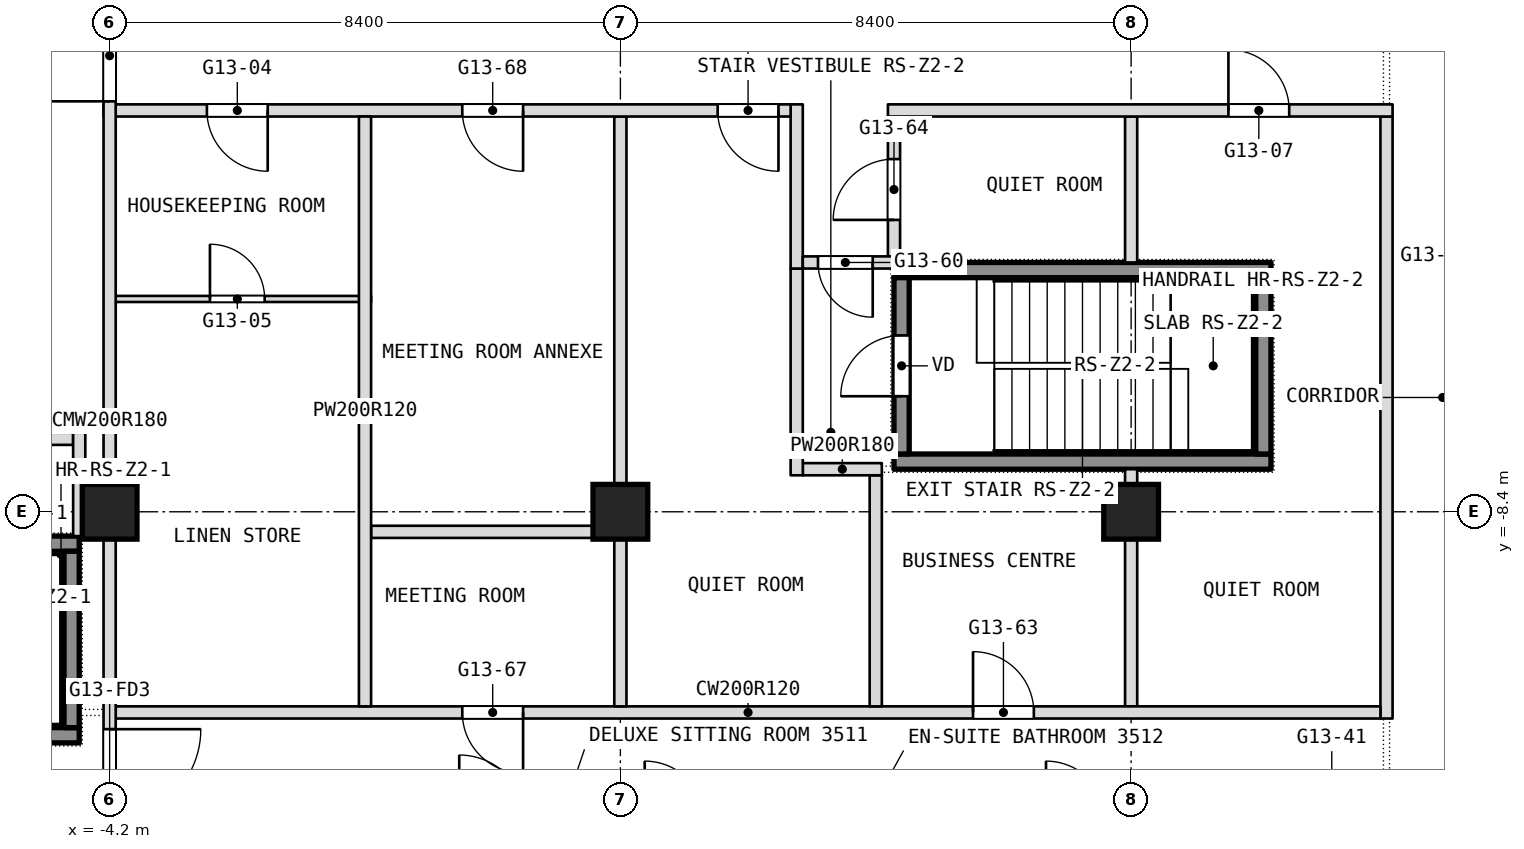
"""IFC4 building model, lengths in metres.
Left out: names, types, materials, properties, quantities, classifications, styles, units other than length and angle.
Written with IfcOpenShell. Run it as: python <this file> out.ifc"""

import sys

from ifc_helpers import new_model, si_unit, direction, frame, frame_2d, origin, origin_2d, place, context, subcontext, project, spatial, rectangle, extrude, element, fill, save


model = new_model("IFC4")
c1 = context("Model", 3, precision=1e-05, world=origin(), true_north=direction((0.0, 1.0)))
c2 = subcontext(c1, "Body", "Model", "MODEL_VIEW")
j1 = project(units=[si_unit("LENGTHUNIT", "METRE"), si_unit("PLANEANGLEUNIT", "RADIAN")], contexts=[c1])
p1 = place(None, origin())
s1 = spatial("IfcSite", under=j1, at=p1, CompositionType="ELEMENT")
p2 = place(p1, origin())
s2 = spatial("IfcBuilding", under=s1, at=p2, CompositionType="ELEMENT")
p3 = place(p2, frame((0.0, 0.0, 151.7)))
s3 = spatial("IfcBuildingStorey", under=s2, at=p3, CompositionType="ELEMENT", Elevation=151.7)
for number, where, z_axis, x_axis in (
    (1, (-4.2, -8.4, 0.0), (0.0, 0.0, 1.0), (1.0, 0.0, 0.0)),
    (2, (4.2, -8.4, 0.0), (0.0, 0.0, 1.0), (1.0, 0.0, 0.0)),
    (3, (12.6, -8.4, 0.0), (0.0, 0.0, 1.0), (1.0, 0.0, 0.0)),
):
    element("IfcColumn", number, at=place(p3, frame(where, z_axis=z_axis, x_axis=x_axis)), inside=s3, PredefinedType="COLUMN", context=c2, shape_type="SweptSolid", body=[
        extrude(rectangle(XDim=0.9, YDim=0.9, at=origin_2d()), origin(), (0.0, 0.0, 1.0), 3.6),
    ])
p4 = place(p3, frame((16.8, -11.8, 0.0), z_axis=(0.0, 0.0, 1.0), x_axis=(0.0, 1.0, 0.0)))
e4 = element("IfcWall", 4, at=p4, inside=s3, PredefinedType="PARTITIONING", context=c2, shape_type="SweptSolid", body=[
    extrude(rectangle(XDim=9.9, YDim=0.2, at=frame_2d((4.95, 0.0))), origin(), (0.0, 0.0, 1.0), 3.34),
])
p5 = place(p3, frame((12.6, -11.6, 0.0), z_axis=(0.0, 0.0, 1.0), x_axis=(0.0, 1.0, 0.0)))
e5 = element("IfcWall", 5, at=p5, inside=s3, PredefinedType="PARTITIONING", context=c2, shape_type="SweptSolid", body=[
    extrude(rectangle(XDim=3.9, YDim=0.2, at=frame_2d((1.95, 0.0))), origin(), (0.0, 0.0, 1.0), 3.34),
])
p6 = place(p3, frame((12.6, -4.3, 0.0), z_axis=(0.0, 0.0, 1.0), x_axis=(0.0, 1.0, 0.0)))
e6 = element("IfcWall", 6, at=p6, inside=s3, PredefinedType="PARTITIONING", context=c2, shape_type="SweptSolid", body=[
    extrude(rectangle(XDim=2.4, YDim=0.2, at=frame_2d((1.2, 0.0))), origin(), (0.0, 0.0, 1.0), 3.34),
])
p7 = place(p3, frame((-4.1, -11.7, 0.0), z_axis=(0.0, 0.0, 1.0), x_axis=(1.0, 0.0, 0.0)))
e7 = element("IfcWall", 7, at=p7, inside=s3, PredefinedType="PARTITIONING", context=c2, shape_type="SweptSolid", body=[
    extrude(rectangle(XDim=20.8, YDim=0.2, at=frame_2d((10.4, 0.0))), origin(), (0.0, 0.0, 1.0), 3.34),
])
p8 = place(p7, frame((14.1, 0.0, 0.0)))
e8 = element("IfcOpeningElement", 8, at=p8, cuts=e7, PredefinedType="OPENING", context=c2, shape_type="SweptSolid", body=[
    extrude(rectangle(XDim=1.0, YDim=2.1, at=frame_2d((0.5, 1.05))), frame((0.0, 0.1, 0.0), z_axis=(0.0, -1.0, 0.0), x_axis=(1.0, 0.0, 0.0)), (0.0, 0.0, 1.0), 0.2),
])
p9 = place(p7, frame((5.7, 0.0, 0.0)))
e9 = element("IfcOpeningElement", 9, at=p9, cuts=e7, PredefinedType="OPENING", context=c2, shape_type="SweptSolid", body=[
    extrude(rectangle(XDim=1.0, YDim=2.1, at=frame_2d((0.5, 1.05))), frame((0.0, 0.1, 0.0), z_axis=(0.0, -1.0, 0.0), x_axis=(1.0, 0.0, 0.0)), (0.0, 0.0, 1.0), 0.2),
])
p10 = place(p3, frame((0.1, -8.73, 0.0), z_axis=(0.0, 0.0, 1.0), x_axis=(1.0, 0.0, 0.0)))
e10 = element("IfcWall", 10, at=p10, inside=s3, PredefinedType="PARTITIONING", context=c2, shape_type="SweptSolid", body=[
    extrude(rectangle(XDim=4.0, YDim=0.2, at=frame_2d((2.0, 0.0))), origin(), (0.0, 0.0, 1.0), 3.34),
])
p11 = place(p3, frame((8.7, -4.3, 0.0), z_axis=(0.0, 0.0, 1.0), x_axis=(0.0, 1.0, 0.0)))
e11 = element("IfcWall", 11, at=p11, inside=s3, PredefinedType="PARTITIONING", context=c2, shape_type="SweptSolid", body=[
    extrude(rectangle(XDim=2.4, YDim=0.2, at=frame_2d((1.2, 0.0))), origin(), (0.0, 0.0, 1.0), 3.34),
])
p12 = place(p11, frame((0.7, 0.0, 0.0)))
e12 = element("IfcOpeningElement", 12, at=p12, cuts=e11, PredefinedType="OPENING", context=c2, shape_type="SweptSolid", body=[
    extrude(rectangle(XDim=1.0, YDim=2.1, at=frame_2d((0.5, 1.05))), frame((0.0, 0.1, 0.0), z_axis=(0.0, -1.0, 0.0), x_axis=(1.0, 0.0, 0.0)), (0.0, 0.0, 1.0), 0.2),
])
p13 = place(p3, frame((8.4, -11.6, 0.0), z_axis=(0.0, 0.0, 1.0), x_axis=(0.0, 1.0, 0.0)))
e13 = element("IfcWall", 13, at=p13, inside=s3, PredefinedType="PARTITIONING", context=c2, shape_type="SweptSolid", body=[
    extrude(rectangle(XDim=3.8, YDim=0.2, at=frame_2d((1.9, 0.0))), origin(), (0.0, 0.0, 1.0), 3.34),
])
p14 = place(p3, frame((7.2, -7.7, 0.0), z_axis=(0.0, 0.0, 1.0), x_axis=(1.0, 0.0, 0.0)))
e14 = element("IfcWall", 14, at=p14, inside=s3, PredefinedType="PARTITIONING", context=c2, shape_type="SweptSolid", body=[
    extrude(rectangle(XDim=1.3, YDim=0.2, at=frame_2d((0.65, 0.0))), origin(), (0.0, 0.0, 1.0), 3.34),
])
p15 = place(p3, frame((-8.5, -7.2, 0.0), z_axis=(0.0, 0.0, 1.0), x_axis=(1.0, 0.0, 0.0)))
e15 = element("IfcWall", 15, at=p15, inside=s3, PredefinedType="PARTITIONING", context=c2, shape_type="SweptSolid", body=[
    extrude(rectangle(XDim=3.7, YDim=0.2, at=frame_2d((1.85, 0.0))), origin(), (0.0, 0.0, 1.0), 3.34),
])
p16 = place(p15, frame((0.25, 0.0, 0.0)))
e16 = element("IfcOpeningElement", 16, at=p16, cuts=e15, PredefinedType="OPENING", context=c2, shape_type="SweptSolid", body=[
    extrude(rectangle(XDim=0.9, YDim=2.1, at=frame_2d((0.45, 1.05))), frame((0.0, 0.1, 0.0), z_axis=(0.0, -1.0, 0.0), x_axis=(1.0, 0.0, 0.0)), (0.0, 0.0, 1.0), 0.2),
])
p17 = place(p3, frame((7.1, -7.8, 0.0), z_axis=(0.0, 0.0, 1.0), x_axis=(0.0, 1.0, 0.0)))
e17 = element("IfcWall", 17, at=p17, inside=s3, PredefinedType="PARTITIONING", context=c2, shape_type="SweptSolid", body=[
    extrude(rectangle(XDim=3.4, YDim=0.2, at=frame_2d((1.7, 0.0))), origin(), (0.0, 0.0, 1.0), 3.34),
])
p18 = place(p3, frame((7.1, -4.4, 0.0), z_axis=(0.0, 0.0, 1.0), x_axis=(0.0, 1.0, 0.0)))
e18 = element("IfcWall", 18, at=p18, inside=s3, PredefinedType="PARTITIONING", context=c2, shape_type="SweptSolid", body=[
    extrude(rectangle(XDim=2.7, YDim=0.2, at=frame_2d((1.35, 0.0))), origin(), (0.0, 0.0, 1.0), 3.34),
])
p19 = place(p3, frame((-4.1, -4.9, 0.0), z_axis=(0.0, 0.0, 1.0), x_axis=(1.0, 0.0, 0.0)))
e19 = element("IfcWall", 19, at=p19, inside=s3, PredefinedType="PARTITIONING", context=c2, shape_type="SweptSolid", body=[
    extrude(rectangle(XDim=4.2, YDim=0.1, at=frame_2d((2.1, 0.0))), origin(), (0.0, 0.0, 1.0), 3.34),
])
p20 = place(p19, frame((1.55, 0.0, 0.0)))
e20 = element("IfcOpeningElement", 20, at=p20, cuts=e19, PredefinedType="OPENING", context=c2, shape_type="SweptSolid", body=[
    extrude(rectangle(XDim=0.9, YDim=2.1, at=frame_2d((0.45, 1.05))), frame((0.0, 0.05, 0.0), z_axis=(0.0, -1.0, 0.0), x_axis=(1.0, 0.0, 0.0)), (0.0, 0.0, 1.0), 0.1),
])
p21 = place(p3, frame((7.2, -4.3, 0.0), z_axis=(0.0, 0.0, 1.0), x_axis=(1.0, 0.0, 0.0)))
e21 = element("IfcWall", 21, at=p21, inside=s3, PredefinedType="PARTITIONING", context=c2, shape_type="SweptSolid", body=[
    extrude(rectangle(XDim=1.5, YDim=0.2, at=frame_2d((0.75, 0.0))), origin(), (0.0, 0.0, 1.0), 3.34),
])
p22 = place(p21, frame((0.25, 0.0, 0.0)))
e22 = element("IfcOpeningElement", 22, at=p22, cuts=e21, PredefinedType="OPENING", context=c2, shape_type="SweptSolid", body=[
    extrude(rectangle(XDim=0.9, YDim=2.1, at=frame_2d((0.45, 1.05))), frame((0.0, 0.1, 0.0), z_axis=(0.0, -1.0, 0.0), x_axis=(1.0, 0.0, 0.0)), (0.0, 0.0, 1.0), 0.2),
])
p23 = place(p3, frame((4.2, -11.6, 0.0), z_axis=(0.0, 0.0, 1.0), x_axis=(0.0, 1.0, 0.0)))
e23 = element("IfcWall", 23, at=p23, inside=s3, PredefinedType="PARTITIONING", context=c2, shape_type="SweptSolid", body=[
    extrude(rectangle(XDim=9.7, YDim=0.2, at=frame_2d((4.85, 0.0))), origin(), (0.0, 0.0, 1.0), 3.34),
])
p24 = place(p3, frame((-4.3, -1.8, 0.0), z_axis=(0.0, 0.0, 1.0), x_axis=(1.0, 0.0, 0.0)))
e24 = element("IfcWall", 24, at=p24, inside=s3, PredefinedType="PARTITIONING", context=c2, shape_type="SweptSolid", body=[
    extrude(rectangle(XDim=11.3, YDim=0.2, at=frame_2d((5.65, 0.0))), origin(), (0.0, 0.0, 1.0), 3.34),
])
p25 = place(p24, frame((1.7, 0.0, 0.0)))
e25 = element("IfcOpeningElement", 25, at=p25, cuts=e24, PredefinedType="OPENING", context=c2, shape_type="SweptSolid", body=[
    extrude(rectangle(XDim=1.0, YDim=2.1, at=frame_2d((0.5, 1.05))), frame((0.0, 0.1, 0.0), z_axis=(0.0, -1.0, 0.0), x_axis=(1.0, 0.0, 0.0)), (0.0, 0.0, 1.0), 0.2),
])
p26 = place(p24, frame((10.1, 0.0, 0.0)))
e26 = element("IfcOpeningElement", 26, at=p26, cuts=e24, PredefinedType="OPENING", context=c2, shape_type="SweptSolid", body=[
    extrude(rectangle(XDim=1.0, YDim=2.1, at=frame_2d((0.5, 1.05))), frame((0.0, 0.1, 0.0), z_axis=(0.0, -1.0, 0.0), x_axis=(1.0, 0.0, 0.0)), (0.0, 0.0, 1.0), 0.2),
])
p27 = place(p24, frame((5.9, 0.0, 0.0)))
e27 = element("IfcOpeningElement", 27, at=p27, cuts=e24, PredefinedType="OPENING", context=c2, shape_type="SweptSolid", body=[
    extrude(rectangle(XDim=1.0, YDim=2.1, at=frame_2d((0.5, 1.05))), frame((0.0, 0.1, 0.0), z_axis=(0.0, -1.0, 0.0), x_axis=(1.0, 0.0, 0.0)), (0.0, 0.0, 1.0), 0.2),
])
p28 = place(p3, frame((8.6, -1.8, 0.0), z_axis=(0.0, 0.0, 1.0), x_axis=(1.0, 0.0, 0.0)))
e28 = element("IfcWall", 28, at=p28, inside=s3, PredefinedType="PARTITIONING", context=c2, shape_type="SweptSolid", body=[
    extrude(rectangle(XDim=8.3, YDim=0.2, at=frame_2d((4.15, 0.0))), origin(), (0.0, 0.0, 1.0), 3.34),
])
p29 = place(p28, frame((5.6, 0.0, 0.0)))
e29 = element("IfcOpeningElement", 29, at=p29, cuts=e28, PredefinedType="OPENING", context=c2, shape_type="SweptSolid", body=[
    extrude(rectangle(XDim=1.0, YDim=2.1, at=frame_2d((0.5, 1.05))), frame((0.0, 0.1, 0.0), z_axis=(0.0, -1.0, 0.0), x_axis=(1.0, 0.0, 0.0)), (0.0, 0.0, 1.0), 0.2),
])
p30 = place(p3, frame((0.0, -11.6, 0.0), z_axis=(0.0, 0.0, 1.0), x_axis=(0.0, 1.0, 0.0)))
e30 = element("IfcWall", 30, at=p30, inside=s3, PredefinedType="PARTITIONING", context=c2, shape_type="SweptSolid", body=[
    extrude(rectangle(XDim=9.7, YDim=0.2, at=frame_2d((4.85, 0.0))), origin(), (0.0, 0.0, 1.0), 3.34),
])
p31 = place(p3, frame((-4.2, -13.8, 0.0), z_axis=(0.0, 0.0, 1.0), x_axis=(0.0, 1.0, 0.0)))
e31 = element("IfcWall", 31, at=p31, inside=s3, PredefinedType="PARTITIONING", context=c2, shape_type="SweptSolid", body=[
    extrude(rectangle(XDim=13.8, YDim=0.2, at=frame_2d((6.9, 0.0))), origin(), (0.0, 0.0, 1.0), 3.34),
])
p32 = place(p31, frame((12.15, 0.0, 0.0)))
e32 = element("IfcOpeningElement", 32, at=p32, cuts=e31, PredefinedType="OPENING", context=c2, shape_type="SweptSolid", body=[
    extrude(rectangle(XDim=1.5, YDim=2.1, at=frame_2d((0.75, 1.05))), frame((0.0, 0.1, 0.0), z_axis=(0.0, -1.0, 0.0), x_axis=(1.0, 0.0, 0.0)), (0.0, 0.0, 1.0), 0.2),
])
p33 = place(p31, frame((0.325, 0.0, 0.0)))
e33 = element("IfcOpeningElement", 33, at=p33, cuts=e31, PredefinedType="OPENING", context=c2, shape_type="SweptSolid", body=[
    extrude(rectangle(XDim=1.5, YDim=2.1, at=frame_2d((0.75, 1.05))), frame((0.0, 0.1, 0.0), z_axis=(0.0, -1.0, 0.0), x_axis=(1.0, 0.0, 0.0)), (0.0, 0.0, 1.0), 0.2),
])
p34 = place(p3, frame((-4.7, -8.8, 0.0), z_axis=(0.0, 0.0, 1.0), x_axis=(0.0, 1.0, 0.0)))
e34 = element("IfcWall", 34, at=p34, inside=s3, PredefinedType="PARTITIONING", context=c2, shape_type="SweptSolid", body=[
    extrude(rectangle(XDim=1.7, YDim=0.2, at=frame_2d((0.85, 0.0))), origin(), (0.0, 0.0, 1.0), 3.34),
])
p35 = place(p3, frame((-10.9, -12.075, 0.1), z_axis=(0.0, 0.0, 1.0), x_axis=(1.0, 0.0, 0.0)))
e35 = element("IfcWall", 35, at=p35, inside=s3, PredefinedType="SHEAR", context=c2, shape_type="SweptSolid", body=[
    extrude(rectangle(XDim=6.2, YDim=0.25, at=frame_2d((3.1, 0.0))), origin(), (0.0, 0.0, 1.0), 3.6),
])
p36 = place(p3, frame((-10.9, -8.925, 0.1), z_axis=(0.0, 0.0, 1.0), x_axis=(1.0, 0.0, 0.0)))
e36 = element("IfcWall", 36, at=p36, inside=s3, PredefinedType="SHEAR", context=c2, shape_type="SweptSolid", body=[
    extrude(rectangle(XDim=6.2, YDim=0.25, at=frame_2d((3.1, 0.0))), origin(), (0.0, 0.0, 1.0), 3.6),
])
p37 = place(p36, frame((0.45, 0.0, 0.0)))
e37 = element("IfcOpeningElement", 37, at=p37, cuts=e36, PredefinedType="OPENING", context=c2, shape_type="SweptSolid", body=[
    extrude(rectangle(XDim=1.0, YDim=2.1, at=frame_2d((0.5, 1.05))), frame((0.0, 0.125, 0.0), z_axis=(0.0, -1.0, 0.0), x_axis=(1.0, 0.0, 0.0)), (0.0, 0.0, 1.0), 0.25),
])
p38 = place(p3, frame((-4.825, -11.95, 0.1), z_axis=(0.0, 0.0, 1.0), x_axis=(0.0, 1.0, 0.0)))
e38 = element("IfcWall", 38, at=p38, inside=s3, PredefinedType="SHEAR", context=c2, shape_type="SweptSolid", body=[
    extrude(rectangle(XDim=2.9, YDim=0.25, at=frame_2d((1.45, 0.0))), origin(), (0.0, 0.0, 1.0), 3.6),
])
for number, where, z_axis, x_axis in (
    (39, (8.7, -7.575, 0.1), (0.0, 0.0, 1.0), (1.0, 0.0, 0.0)),
    (40, (8.7, -4.425, 0.1), (0.0, 0.0, 1.0), (1.0, 0.0, 0.0)),
):
    element("IfcWall", number, at=place(p3, frame(where, z_axis=z_axis, x_axis=x_axis)), inside=s3, PredefinedType="SHEAR", context=c2, shape_type="SweptSolid", body=[
        extrude(rectangle(XDim=6.2, YDim=0.25, at=frame_2d((3.1, 0.0))), origin(), (0.0, 0.0, 1.0), 3.6),
    ])
p39 = place(p3, frame((8.825, -7.45, 0.1), z_axis=(0.0, 0.0, 1.0), x_axis=(0.0, 1.0, 0.0)))
e41 = element("IfcWall", 41, at=p39, inside=s3, PredefinedType="SHEAR", context=c2, shape_type="SweptSolid", body=[
    extrude(rectangle(XDim=2.9, YDim=0.25, at=frame_2d((1.45, 0.0))), origin(), (0.0, 0.0, 1.0), 3.6),
])
p40 = place(p39, frame((0.95, 0.0, 0.0)))
e42 = element("IfcOpeningElement", 42, at=p40, cuts=e41, PredefinedType="OPENING", context=c2, shape_type="SweptSolid", body=[
    extrude(rectangle(XDim=1.0, YDim=2.1, at=frame_2d((0.5, 1.05))), frame((0.0, 0.125, 0.0), z_axis=(0.0, -1.0, 0.0), x_axis=(1.0, 0.0, 0.0)), (0.0, 0.0, 1.0), 0.25),
])
p41 = place(p3, frame((14.775, -7.45, 0.1), z_axis=(0.0, 0.0, 1.0), x_axis=(0.0, 1.0, 0.0)))
e43 = element("IfcWall", 43, at=p41, inside=s3, PredefinedType="SHEAR", context=c2, shape_type="SweptSolid", body=[
    extrude(rectangle(XDim=2.9, YDim=0.25, at=frame_2d((1.45, 0.0))), origin(), (0.0, 0.0, 1.0), 3.6),
])
p42 = place(p8, origin())
e44 = element("IfcDoor", 44, at=p42, inside=s3, OperationType="SINGLE_SWING_LEFT", PredefinedType="DOOR", context=c2, shape_type="SweptSolid", body=[
    extrude(rectangle(XDim=1.0, YDim=2.1, at=frame_2d((0.5, 1.05))), frame((0.0, 0.025, 0.0), z_axis=(0.0, -1.0, 0.0), x_axis=(1.0, 0.0, 0.0)), (0.0, 0.0, 1.0), 0.05),
])
fill(e8, e44)
p43 = place(p9, origin())
e45 = element("IfcDoor", 45, at=p43, inside=s3, OperationType="SINGLE_SWING_LEFT", PredefinedType="DOOR", context=c2, shape_type="SweptSolid", body=[
    extrude(rectangle(XDim=1.0, YDim=2.1, at=frame_2d((0.5, 1.05))), frame((0.0, 0.025, 0.0), z_axis=(0.0, -1.0, 0.0), x_axis=(1.0, 0.0, 0.0)), (0.0, 0.0, 1.0), 0.05),
])
fill(e9, e45)
p44 = place(p12, origin())
e46 = element("IfcDoor", 46, at=p44, inside=s3, OperationType="SINGLE_SWING_LEFT", PredefinedType="DOOR", context=c2, shape_type="SweptSolid", body=[
    extrude(rectangle(XDim=1.0, YDim=2.1, at=frame_2d((0.5, 1.05))), frame((0.0, 0.025, 0.0), z_axis=(0.0, -1.0, 0.0), x_axis=(1.0, 0.0, 0.0)), (0.0, 0.0, 1.0), 0.05),
])
fill(e12, e46)
p45 = place(p20, origin())
e47 = element("IfcDoor", 47, at=p45, inside=s3, OperationType="SINGLE_SWING_LEFT", PredefinedType="DOOR", context=c2, shape_type="SweptSolid", body=[
    extrude(rectangle(XDim=0.9, YDim=2.1, at=frame_2d((0.45, 1.05))), frame((0.0, 0.025, 0.0), z_axis=(0.0, -1.0, 0.0), x_axis=(1.0, 0.0, 0.0)), (0.0, 0.0, 1.0), 0.05),
])
fill(e20, e47)
p46 = place(p22, origin())
e48 = element("IfcDoor", 48, at=p46, inside=s3, OperationType="SINGLE_SWING_RIGHT", PredefinedType="DOOR", context=c2, shape_type="SweptSolid", body=[
    extrude(rectangle(XDim=0.9, YDim=2.1, at=frame_2d((0.45, 1.05))), frame((0.0, 0.025, 0.0), z_axis=(0.0, -1.0, 0.0), x_axis=(1.0, 0.0, 0.0)), (0.0, 0.0, 1.0), 0.05),
])
fill(e22, e48)
p47 = place(p25, origin())
e49 = element("IfcDoor", 49, at=p47, inside=s3, OperationType="SINGLE_SWING_RIGHT", PredefinedType="DOOR", context=c2, shape_type="SweptSolid", body=[
    extrude(rectangle(XDim=1.0, YDim=2.1, at=frame_2d((0.5, 1.05))), frame((0.0, 0.025, 0.0), z_axis=(0.0, -1.0, 0.0), x_axis=(1.0, 0.0, 0.0)), (0.0, 0.0, 1.0), 0.05),
])
fill(e25, e49)
p48 = place(p26, origin())
e50 = element("IfcDoor", 50, at=p48, inside=s3, OperationType="SINGLE_SWING_LEFT", PredefinedType="DOOR", context=c2, shape_type="SweptSolid", body=[
    extrude(rectangle(XDim=1.0, YDim=2.1, at=frame_2d((0.5, 1.05))), frame((0.0, 0.025, 0.0), z_axis=(0.0, -1.0, 0.0), x_axis=(1.0, 0.0, 0.0)), (0.0, 0.0, 1.0), 0.05),
])
fill(e26, e50)
p49 = place(p27, origin())
e51 = element("IfcDoor", 51, at=p49, inside=s3, OperationType="SINGLE_SWING_RIGHT", PredefinedType="DOOR", context=c2, shape_type="SweptSolid", body=[
    extrude(rectangle(XDim=1.0, YDim=2.1, at=frame_2d((0.5, 1.05))), frame((0.0, 0.025, 0.0), z_axis=(0.0, -1.0, 0.0), x_axis=(1.0, 0.0, 0.0)), (0.0, 0.0, 1.0), 0.05),
])
fill(e27, e51)
p50 = place(p29, origin())
e52 = element("IfcDoor", 52, at=p50, inside=s3, OperationType="SINGLE_SWING_LEFT", PredefinedType="DOOR", context=c2, shape_type="SweptSolid", body=[
    extrude(rectangle(XDim=1.0, YDim=2.1, at=frame_2d((0.5, 1.05))), frame((0.0, 0.025, 0.0), z_axis=(0.0, -1.0, 0.0), x_axis=(1.0, 0.0, 0.0)), (0.0, 0.0, 1.0), 0.05),
])
fill(e29, e52)
p51 = place(p40, origin())
e53 = element("IfcDoor", 53, at=p51, inside=s3, OperationType="SINGLE_SWING_LEFT", PredefinedType="DOOR", context=c2, shape_type="SweptSolid", body=[
    extrude(rectangle(XDim=1.0, YDim=2.1, at=frame_2d((0.5, 1.05))), frame((0.0, 0.025, 0.0), z_axis=(0.0, -1.0, 0.0), x_axis=(1.0, 0.0, 0.0)), (0.0, 0.0, 1.0), 0.05),
])
fill(e42, e53)
p52 = place(p32, origin())
e54 = element("IfcDoor", 54, at=p52, inside=s3, OperationType="DOUBLE_DOOR_DOUBLE_SWING", PredefinedType="DOOR", context=c2, shape_type="SweptSolid", body=[
    extrude(rectangle(XDim=1.5, YDim=2.1, at=frame_2d((0.75, 1.05))), frame((0.0, 0.025, 0.0), z_axis=(0.0, -1.0, 0.0), x_axis=(1.0, 0.0, 0.0)), (0.0, 0.0, 1.0), 0.05),
])
fill(e32, e54)
p53 = place(p33, origin())
e55 = element("IfcDoor", 55, at=p53, inside=s3, OperationType="DOUBLE_DOOR_DOUBLE_SWING", PredefinedType="DOOR", context=c2, shape_type="SweptSolid", body=[
    extrude(rectangle(XDim=1.5, YDim=2.1, at=frame_2d((0.75, 1.05))), frame((0.0, 0.025, 0.0), z_axis=(0.0, -1.0, 0.0), x_axis=(1.0, 0.0, 0.0)), (0.0, 0.0, 1.0), 0.05),
])
fill(e33, e55)
save(model, sys.argv[1])
